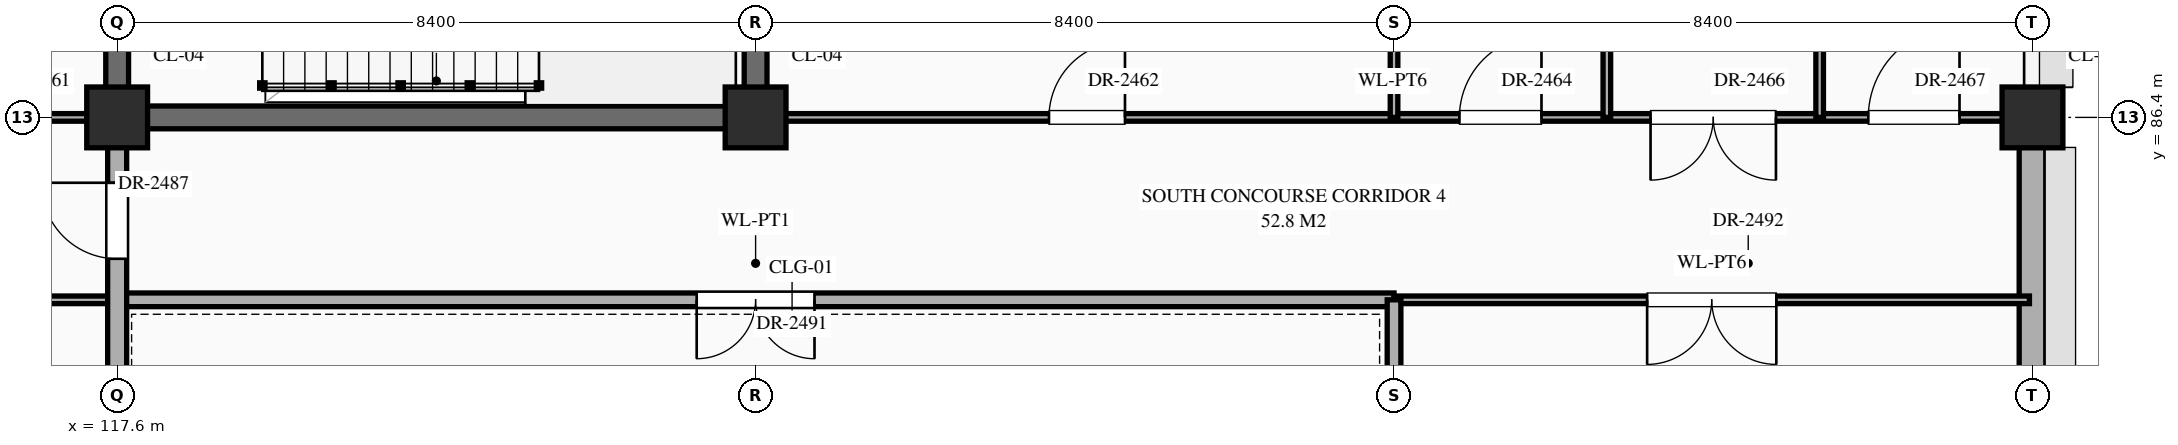
"""IFC4 building model, lengths in metres.
Left out: names, types, materials, properties, quantities, classifications, styles, units other than length and angle.
Written with IfcOpenShell. Run it as: python <this file> out.ifc"""

import sys

from ifc_helpers import new_model, si_unit, direction, frame, frame_2d, origin, origin_2d, place, context, subcontext, project, spatial, rectangle, extrude, element, fill, save


model = new_model("IFC4")
c1 = context("Model", 3, precision=1e-05, world=origin(), true_north=direction((0.0, 1.0)))
c2 = subcontext(c1, "Body", "Model", "MODEL_VIEW")
j1 = project(units=[si_unit("LENGTHUNIT", "METRE"), si_unit("PLANEANGLEUNIT", "RADIAN")], contexts=[c1])
p1 = place(None, origin())
s1 = spatial("IfcSite", under=j1, at=p1, CompositionType="ELEMENT")
p2 = place(p1, origin())
s2 = spatial("IfcBuilding", under=s1, at=p2, CompositionType="ELEMENT")
p3 = place(p2, frame((0.0, 0.0, 30.6)))
s3 = spatial("IfcBuildingStorey", under=s2, at=p3, CompositionType="ELEMENT", Elevation=30.6)
for number, where, z_axis, x_axis in (
    (1, (117.6, 86.4, 0.0), (0.0, 0.0, 1.0), (1.0, 0.0, 0.0)),
    (2, (126.0, 86.4, 0.0), (0.0, 0.0, 1.0), (1.0, 0.0, 0.0)),
    (3, (142.8, 86.4, 0.0), (0.0, 0.0, 1.0), (1.0, 0.0, 0.0)),
):
    element("IfcColumn", number, at=place(p3, frame(where, z_axis=z_axis, x_axis=x_axis)), inside=s3, PredefinedType="COLUMN", context=c2, shape_type="SweptSolid", body=[
        extrude(rectangle(XDim=0.8, YDim=0.8, at=origin_2d()), origin(), (0.0, 0.0, 1.0), 4.5),
    ])
p4 = place(p3, frame((142.8, 79.595, 0.0), z_axis=(0.0, 0.0, 1.0), x_axis=(0.0, 1.0, 0.0)))
e4 = element("IfcWall", 4, at=p4, inside=s3, PredefinedType="STANDARD", context=c2, shape_type="SweptSolid", body=[
    extrude(rectangle(XDim=6.41, YDim=0.35, at=frame_2d((3.205, 0.0))), origin(), (0.0, 0.0, 1.0), 3.65),
])
p5 = place(p4, frame((1.23, 0.0, 0.85)))
e5 = element("IfcOpeningElement", 5, at=p5, cuts=e4, PredefinedType="OPENING", context=c2, shape_type="SweptSolid", body=[
    extrude(rectangle(XDim=1.55, YDim=1.74, at=frame_2d((0.775, 0.87))), frame((0.0, 0.187, 0.0), z_axis=(0.0, -1.0, 0.0), x_axis=(1.0, 0.0, 0.0)), (0.0, 0.0, 1.0), 0.374),
])
p6 = place(p3, frame((100.8, 84.0, 0.0), z_axis=(0.0, 0.0, 1.0), x_axis=(1.0, 0.0, 0.0)))
e6 = element("IfcWall", 6, at=p6, inside=s3, PredefinedType="STANDARD", context=c2, shape_type="SweptSolid", body=[
    extrude(rectangle(XDim=16.8, YDim=0.1, at=frame_2d((8.4, 0.0))), origin(), (0.0, 0.0, 1.0), 4.24),
])
p7 = place(p6, frame((3.69, 0.0, 0.0)))
e7 = element("IfcOpeningElement", 7, at=p7, cuts=e6, PredefinedType="OPENING", context=c2, shape_type="SweptSolid", body=[
    extrude(rectangle(XDim=1.02, YDim=2.4, at=frame_2d((0.51, 1.2))), frame((0.0, 0.062, 0.0), z_axis=(0.0, -1.0, 0.0), x_axis=(1.0, 0.0, 0.0)), (0.0, 0.0, 1.0), 0.124),
])
p8 = place(p6, frame((12.07, 0.0, 0.0)))
e8 = element("IfcOpeningElement", 8, at=p8, cuts=e6, PredefinedType="OPENING", context=c2, shape_type="SweptSolid", body=[
    extrude(rectangle(XDim=1.06, YDim=2.4, at=frame_2d((0.53, 1.2))), frame((0.0, 0.062, 0.0), z_axis=(0.0, -1.0, 0.0), x_axis=(1.0, 0.0, 0.0)), (0.0, 0.0, 1.0), 0.124),
])
p9 = place(p3, frame((117.6, 84.0, 0.0), z_axis=(0.0, 0.0, 1.0), x_axis=(1.0, 0.0, 0.0)))
e9 = element("IfcWall", 9, at=p9, inside=s3, PredefinedType="STANDARD", context=c2, shape_type="SweptSolid", body=[
    extrude(rectangle(XDim=16.8, YDim=0.18, at=frame_2d((8.4, 0.0))), origin(), (0.0, 0.0, 1.0), 4.24),
])
p10 = place(p9, frame((7.625, 0.0, 0.0)))
e10 = element("IfcOpeningElement", 10, at=p10, cuts=e9, PredefinedType="OPENING", context=c2, shape_type="SweptSolid", body=[
    extrude(rectangle(XDim=1.55, YDim=2.35, at=frame_2d((0.775, 1.175))), frame((0.0, 0.102, 0.0), z_axis=(0.0, -1.0, 0.0), x_axis=(1.0, 0.0, 0.0)), (0.0, 0.0, 1.0), 0.204),
])
p11 = place(p3, frame((134.4, 84.0, 0.0), z_axis=(0.0, 0.0, 1.0), x_axis=(1.0, 0.0, 0.0)))
e11 = element("IfcWall", 11, at=p11, inside=s3, PredefinedType="STANDARD", context=c2, shape_type="SweptSolid", body=[
    extrude(rectangle(XDim=8.36, YDim=0.1, at=frame_2d((4.18, 0.0))), origin(), (0.0, 0.0, 1.0), 4.3),
])
p12 = place(p11, frame((3.33, 0.0, 0.0)))
e12 = element("IfcOpeningElement", 12, at=p12, cuts=e11, PredefinedType="OPENING", context=c2, shape_type="SweptSolid", body=[
    extrude(rectangle(XDim=1.7, YDim=2.45, at=frame_2d((0.85, 1.225))), frame((0.0, 0.062, 0.0), z_axis=(0.0, -1.0, 0.0), x_axis=(1.0, 0.0, 0.0)), (0.0, 0.0, 1.0), 0.124),
])
p13 = place(p3, frame((109.2, 86.4, 0.0), z_axis=(0.0, 0.0, 1.0), x_axis=(1.0, 0.0, 0.0)))
e13 = element("IfcWall", 13, at=p13, inside=s3, PredefinedType="STANDARD", context=c2, shape_type="SweptSolid", body=[
    extrude(rectangle(XDim=8.4, YDim=0.1, at=frame_2d((4.2, 0.0))), origin(), (0.0, 0.0, 1.0), 3.39),
])
p14 = place(p13, frame((1.11, 0.0, 0.0)))
e14 = element("IfcOpeningElement", 14, at=p14, cuts=e13, PredefinedType="OPENING", context=c2, shape_type="SweptSolid", body=[
    extrude(rectangle(XDim=0.9, YDim=2.15, at=frame_2d((0.45, 1.075))), frame((0.0, 0.062, 0.0), z_axis=(0.0, -1.0, 0.0), x_axis=(1.0, 0.0, 0.0)), (0.0, 0.0, 1.0), 0.124),
])
p15 = place(p13, frame((3.74, 0.0, 0.0)))
e15 = element("IfcOpeningElement", 15, at=p15, cuts=e13, PredefinedType="OPENING", context=c2, shape_type="SweptSolid", body=[
    extrude(rectangle(XDim=0.92, YDim=2.15, at=frame_2d((0.46, 1.075))), frame((0.0, 0.062, 0.0), z_axis=(0.0, -1.0, 0.0), x_axis=(1.0, 0.0, 0.0)), (0.0, 0.0, 1.0), 0.124),
])
p16 = place(p13, frame((6.36, 0.0, 0.0)))
e16 = element("IfcOpeningElement", 16, at=p16, cuts=e13, PredefinedType="OPENING", context=c2, shape_type="SweptSolid", body=[
    extrude(rectangle(XDim=0.96, YDim=2.2, at=frame_2d((0.48, 1.1))), frame((0.0, 0.062, 0.0), z_axis=(0.0, -1.0, 0.0), x_axis=(1.0, 0.0, 0.0)), (0.0, 0.0, 1.0), 0.124),
])
p17 = place(p3, frame((117.6, 86.4, 0.0), z_axis=(0.0, 0.0, 1.0), x_axis=(1.0, 0.0, 0.0)))
e17 = element("IfcWall", 17, at=p17, inside=s3, PredefinedType="SHEAR", context=c2, shape_type="SweptSolid", body=[
    extrude(rectangle(XDim=8.4, YDim=0.3, at=frame_2d((4.2, 0.0))), origin(), (0.0, 0.0, 1.0), 4.24),
])
p18 = place(p3, frame((126.0, 86.4, 0.0), z_axis=(0.0, 0.0, 1.0), x_axis=(1.0, 0.0, 0.0)))
e18 = element("IfcWall", 18, at=p18, inside=s3, PredefinedType="STANDARD", context=c2, shape_type="SweptSolid", body=[
    extrude(rectangle(XDim=16.76, YDim=0.1, at=frame_2d((8.38, 0.0))), origin(), (0.0, 0.0, 1.0), 3.1),
])
p19 = place(p18, frame((3.86, 0.0, 0.0)))
e19 = element("IfcOpeningElement", 19, at=p19, cuts=e18, PredefinedType="OPENING", context=c2, shape_type="SweptSolid", body=[
    extrude(rectangle(XDim=1.0, YDim=2.25, at=frame_2d((0.5, 1.125))), frame((0.0, 0.062, 0.0), z_axis=(0.0, -1.0, 0.0), x_axis=(1.0, 0.0, 0.0)), (0.0, 0.0, 1.0), 0.124),
])
p20 = place(p18, frame((9.26, 0.0, 0.0)))
e20 = element("IfcOpeningElement", 20, at=p20, cuts=e18, PredefinedType="OPENING", context=c2, shape_type="SweptSolid", body=[
    extrude(rectangle(XDim=1.08, YDim=2.25, at=frame_2d((0.54, 1.125))), frame((0.0, 0.062, 0.0), z_axis=(0.0, -1.0, 0.0), x_axis=(1.0, 0.0, 0.0)), (0.0, 0.0, 1.0), 0.124),
])
p21 = place(p18, frame((11.775, 0.0, 0.0)))
e21 = element("IfcOpeningElement", 21, at=p21, cuts=e18, PredefinedType="OPENING", context=c2, shape_type="SweptSolid", body=[
    extrude(rectangle(XDim=1.65, YDim=2.4, at=frame_2d((0.825, 1.2))), frame((0.0, 0.062, 0.0), z_axis=(0.0, -1.0, 0.0), x_axis=(1.0, 0.0, 0.0)), (0.0, 0.0, 1.0), 0.124),
])
p22 = place(p18, frame((14.64, 0.0, 0.0)))
e22 = element("IfcOpeningElement", 22, at=p22, cuts=e18, PredefinedType="OPENING", context=c2, shape_type="SweptSolid", body=[
    extrude(rectangle(XDim=1.2, YDim=2.35, at=frame_2d((0.6, 1.175))), frame((0.0, 0.062, 0.0), z_axis=(0.0, -1.0, 0.0), x_axis=(1.0, 0.0, 0.0)), (0.0, 0.0, 1.0), 0.124),
])
p23 = place(p3, frame((117.6, 79.24, 0.0), z_axis=(0.0, 0.0, 1.0), x_axis=(0.0, 1.0, 0.0)))
e23 = element("IfcWall", 23, at=p23, inside=s3, PredefinedType="STANDARD", context=c2, shape_type="SweptSolid", body=[
    extrude(rectangle(XDim=7.16, YDim=0.25, at=frame_2d((3.58, 0.0))), origin(), (0.0, 0.0, 1.0), 3.49),
])
p24 = place(p23, frame((5.3, 0.0, 0.0)))
e24 = element("IfcOpeningElement", 24, at=p24, cuts=e23, PredefinedType="OPENING", context=c2, shape_type="SweptSolid", body=[
    extrude(rectangle(XDim=1.0, YDim=2.2, at=frame_2d((0.5, 1.1))), frame((0.0, 0.137, 0.0), z_axis=(0.0, -1.0, 0.0), x_axis=(1.0, 0.0, 0.0)), (0.0, 0.0, 1.0), 0.274),
])
for number, where, z_axis, x_axis in (
    (25, (117.6, 86.4, 0.0), (0.0, 0.0, 1.0), (0.0, 1.0, 0.0)),
    (26, (126.0, 86.4, 0.0), (0.0, 0.0, 1.0), (0.0, 1.0, 0.0)),
):
    element("IfcWall", number, at=place(p3, frame(where, z_axis=z_axis, x_axis=x_axis)), inside=s3, PredefinedType="SHEAR", context=c2, shape_type="SweptSolid", body=[
        extrude(rectangle(XDim=4.8, YDim=0.3, at=frame_2d((2.4, 0.0))), origin(), (0.0, 0.0, 1.0), 4.24),
    ])
p25 = place(p3, frame((134.4, 79.24, 0.0), z_axis=(0.0, 0.0, 1.0), x_axis=(0.0, 1.0, 0.0)))
e27 = element("IfcWall", 27, at=p25, inside=s3, PredefinedType="STANDARD", context=c2, shape_type="SweptSolid", body=[
    extrude(rectangle(XDim=4.76, YDim=0.18, at=frame_2d((2.38, 0.0))), origin(), (0.0, 0.0, 1.0), 4.15),
])
p26 = place(p25, frame((1.57, 0.0, 0.0)))
e28 = element("IfcOpeningElement", 28, at=p26, cuts=e27, PredefinedType="OPENING", context=c2, shape_type="SweptSolid", body=[
    extrude(rectangle(XDim=1.9, YDim=2.5, at=frame_2d((0.95, 1.25))), frame((0.0, 0.102, 0.0), z_axis=(0.0, -1.0, 0.0), x_axis=(1.0, 0.0, 0.0)), (0.0, 0.0, 1.0), 0.204),
])
p27 = place(p3, frame((134.4, 86.4, 0.0), z_axis=(0.0, 0.0, 1.0), x_axis=(0.0, 1.0, 0.0)))
e29 = element("IfcWall", 29, at=p27, inside=s3, PredefinedType="STANDARD", context=c2, shape_type="SweptSolid", body=[
    extrude(rectangle(XDim=7.2, YDim=0.1, at=frame_2d((3.6, 0.0))), origin(), (0.0, 0.0, 1.0), 4.15),
])
p28 = place(p3, frame((137.2, 86.4, 0.0), z_axis=(0.0, 0.0, 1.0), x_axis=(0.0, 1.0, 0.0)))
e30 = element("IfcWall", 30, at=p28, inside=s3, PredefinedType="STANDARD", context=c2, shape_type="SweptSolid", body=[
    extrude(rectangle(XDim=7.2, YDim=0.1, at=frame_2d((3.6, 0.0))), origin(), (0.0, 0.0, 1.0), 4.3),
])
p29 = place(p28, frame((3.08, 0.0, 0.0)))
e31 = element("IfcOpeningElement", 31, at=p29, cuts=e30, PredefinedType="OPENING", context=c2, shape_type="SweptSolid", body=[
    extrude(rectangle(XDim=1.04, YDim=2.2, at=frame_2d((0.52, 1.1))), frame((0.0, 0.062, 0.0), z_axis=(0.0, -1.0, 0.0), x_axis=(1.0, 0.0, 0.0)), (0.0, 0.0, 1.0), 0.124),
])
p30 = place(p3, frame((140.0, 86.4, 0.0), z_axis=(0.0, 0.0, 1.0), x_axis=(0.0, 1.0, 0.0)))
e32 = element("IfcWall", 32, at=p30, inside=s3, PredefinedType="STANDARD", context=c2, shape_type="SweptSolid", body=[
    extrude(rectangle(XDim=7.2, YDim=0.1, at=frame_2d((3.6, 0.0))), origin(), (0.0, 0.0, 1.0), 4.3),
])
p31 = place(p30, frame((3.04, 0.0, 0.0)))
e33 = element("IfcOpeningElement", 33, at=p31, cuts=e32, PredefinedType="OPENING", context=c2, shape_type="SweptSolid", body=[
    extrude(rectangle(XDim=1.12, YDim=2.25, at=frame_2d((0.56, 1.125))), frame((0.0, 0.062, 0.0), z_axis=(0.0, -1.0, 0.0), x_axis=(1.0, 0.0, 0.0)), (0.0, 0.0, 1.0), 0.124),
])
p32 = place(p19, origin())
e34 = element("IfcDoor", 34, at=p32, inside=s3, OperationType="SINGLE_SWING_RIGHT", PredefinedType="DOOR", context=c2, shape_type="SweptSolid", body=[
    extrude(rectangle(XDim=1.0, YDim=2.25, at=frame_2d((0.5, 1.125))), frame((0.0, 0.025, 0.0), z_axis=(0.0, -1.0, 0.0), x_axis=(1.0, 0.0, 0.0)), (0.0, 0.0, 1.0), 0.05),
])
fill(e19, e34)
p33 = place(p20, origin())
e35 = element("IfcDoor", 35, at=p33, inside=s3, OperationType="SINGLE_SWING_RIGHT", PredefinedType="DOOR", context=c2, shape_type="SweptSolid", body=[
    extrude(rectangle(XDim=1.08, YDim=2.25, at=frame_2d((0.54, 1.125))), frame((0.0, 0.025, 0.0), z_axis=(0.0, -1.0, 0.0), x_axis=(1.0, 0.0, 0.0)), (0.0, 0.0, 1.0), 0.05),
])
fill(e20, e35)
p34 = place(p21, frame((1.65, 0.0, 0.0), z_axis=(0.0, 0.0, 1.0), x_axis=(-1.0, 0.0, 0.0)))
e36 = element("IfcDoor", 36, at=p34, inside=s3, OperationType="DOUBLE_DOOR_SINGLE_SWING", PredefinedType="DOOR", context=c2, shape_type="SweptSolid", body=[
    extrude(rectangle(XDim=1.65, YDim=2.4, at=frame_2d((0.825, 1.2))), frame((0.0, 0.025, 0.0), z_axis=(0.0, -1.0, 0.0), x_axis=(1.0, 0.0, 0.0)), (0.0, 0.0, 1.0), 0.05),
])
fill(e21, e36)
p35 = place(p22, origin())
e37 = element("IfcDoor", 37, at=p35, inside=s3, OperationType="SINGLE_SWING_RIGHT", PredefinedType="DOOR", context=c2, shape_type="SweptSolid", body=[
    extrude(rectangle(XDim=1.2, YDim=2.35, at=frame_2d((0.6, 1.175))), frame((0.0, 0.025, 0.0), z_axis=(0.0, -1.0, 0.0), x_axis=(1.0, 0.0, 0.0)), (0.0, 0.0, 1.0), 0.05),
])
fill(e22, e37)
p36 = place(p24, origin())
e38 = element("IfcDoor", 38, at=p36, inside=s3, OperationType="SINGLE_SWING_RIGHT", PredefinedType="DOOR", context=c2, shape_type="SweptSolid", body=[
    extrude(rectangle(XDim=1.0, YDim=2.2, at=frame_2d((0.5, 1.1))), frame((0.0, 0.025, 0.0), z_axis=(0.0, -1.0, 0.0), x_axis=(1.0, 0.0, 0.0)), (0.0, 0.0, 1.0), 0.05),
])
fill(e24, e38)
p37 = place(p10, frame((1.55, 0.0, 0.0), z_axis=(0.0, 0.0, 1.0), x_axis=(-1.0, 0.0, 0.0)))
e39 = element("IfcDoor", 39, at=p37, inside=s3, OperationType="DOUBLE_DOOR_SINGLE_SWING", PredefinedType="DOOR", context=c2, shape_type="SweptSolid", body=[
    extrude(rectangle(XDim=1.55, YDim=2.35, at=frame_2d((0.775, 1.175))), frame((0.0, 0.025, 0.0), z_axis=(0.0, -1.0, 0.0), x_axis=(1.0, 0.0, 0.0)), (0.0, 0.0, 1.0), 0.05),
])
fill(e10, e39)
p38 = place(p12, frame((1.7, 0.0, 0.0), z_axis=(0.0, 0.0, 1.0), x_axis=(-1.0, 0.0, 0.0)))
e40 = element("IfcDoor", 40, at=p38, inside=s3, OperationType="DOUBLE_DOOR_SINGLE_SWING", PredefinedType="DOOR", context=c2, shape_type="SweptSolid", body=[
    extrude(rectangle(XDim=1.7, YDim=2.45, at=frame_2d((0.85, 1.225))), frame((0.0, 0.025, 0.0), z_axis=(0.0, -1.0, 0.0), x_axis=(1.0, 0.0, 0.0)), (0.0, 0.0, 1.0), 0.05),
])
fill(e12, e40)
save(model, sys.argv[1])
